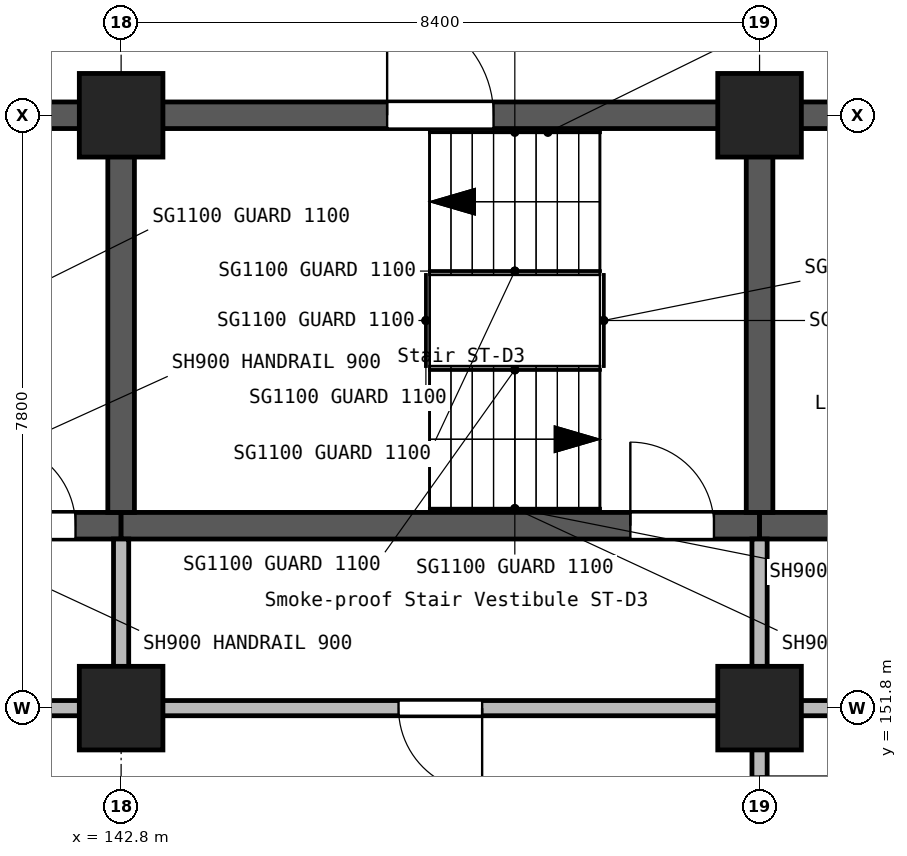
"""IFC4 building model, lengths in metres.
Left out: names, types, materials, properties, quantities, classifications, styles, units other than length and angle.
Written with IfcOpenShell. Run it as: python <this file> out.ifc"""

import sys

from ifc_helpers import new_model, si_unit, direction, frame, frame_2d, origin, origin_2d, place, context, subcontext, project, spatial, rectangle, extrude, element, fill, save


model = new_model("IFC4")
c1 = context("Model", 3, precision=1e-05, world=origin(), true_north=direction((0.0, 1.0)))
c2 = subcontext(c1, "Body", "Model", "MODEL_VIEW")
j1 = project(units=[si_unit("LENGTHUNIT", "METRE"), si_unit("PLANEANGLEUNIT", "RADIAN")], contexts=[c1])
p1 = place(None, origin())
s1 = spatial("IfcSite", under=j1, at=p1, CompositionType="ELEMENT")
p2 = place(p1, origin())
s2 = spatial("IfcBuilding", under=s1, at=p2, CompositionType="ELEMENT")
p3 = place(p2, origin())
s3 = spatial("IfcBuildingStorey", under=s2, at=p3, CompositionType="ELEMENT", Elevation=0.0)
for number, where, z_axis, x_axis in (
    (1, (142.8, 151.8, -0.3), (0.0, 0.0, 1.0), (1.0, 0.0, 0.0)),
    (2, (142.8, 159.6, -0.3), (0.0, 0.0, 1.0), (1.0, 0.0, 0.0)),
    (3, (151.2, 151.8, -0.3), (0.0, 0.0, 1.0), (1.0, 0.0, 0.0)),
    (4, (151.2, 159.6, -0.3), (0.0, 0.0, 1.0), (1.0, 0.0, 0.0)),
):
    element("IfcColumn", number, at=place(p3, frame(where, z_axis=z_axis, x_axis=x_axis)), inside=s3, PredefinedType="COLUMN", context=c2, shape_type="SweptSolid", body=[
        extrude(rectangle(XDim=1.1, YDim=1.1, at=origin_2d()), origin(), (0.0, 0.0, 1.0), 5.7),
    ])
p4 = place(p3, frame((134.225, 159.6, -0.3), z_axis=(0.0, 0.0, 1.0), x_axis=(1.0, 0.0, 0.0)))
e5 = element("IfcWall", 5, at=p4, inside=s3, PredefinedType="SHEAR", context=c2, shape_type="SweptSolid", body=[
    extrude(rectangle(XDim=8.575, YDim=0.35, at=frame_2d((4.288, 0.0))), origin(), (0.0, 0.0, 1.0), 5.7),
])
p5 = place(p4, frame((3.675, 0.0, 0.3)))
e6 = element("IfcOpeningElement", 6, at=p5, cuts=e5, PredefinedType="OPENING", context=c2, shape_type="SweptSolid", body=[
    extrude(rectangle(XDim=1.4, YDim=2.1, at=frame_2d((0.7, 1.05))), frame((0.0, 0.185, 0.0), z_axis=(0.0, -1.0, 0.0), x_axis=(1.0, 0.0, 0.0)), (0.0, 0.0, 1.0), 0.37),
])
p6 = place(p3, frame((134.575, 154.2, -0.3), z_axis=(0.0, 0.0, 1.0), x_axis=(1.0, 0.0, 0.0)))
e7 = element("IfcWall", 7, at=p6, inside=s3, PredefinedType="SHEAR", context=c2, shape_type="SweptSolid", body=[
    extrude(rectangle(XDim=8.225, YDim=0.35, at=frame_2d((4.113, 0.0))), origin(), (0.0, 0.0, 1.0), 5.7),
])
p7 = place(p6, frame((6.525, 0.0, 0.3)))
e8 = element("IfcOpeningElement", 8, at=p7, cuts=e7, PredefinedType="OPENING", context=c2, shape_type="SweptSolid", body=[
    extrude(rectangle(XDim=1.1, YDim=2.1, at=frame_2d((0.55, 1.05))), frame((0.0, 0.185, 0.0), z_axis=(0.0, -1.0, 0.0), x_axis=(1.0, 0.0, 0.0)), (0.0, 0.0, 1.0), 0.37),
])
p8 = place(p3, frame((142.8, 154.2, -0.3), z_axis=(0.0, 0.0, 1.0), x_axis=(1.0, 0.0, 0.0)))
e9 = element("IfcWall", 9, at=p8, inside=s3, PredefinedType="SHEAR", context=c2, shape_type="SweptSolid", body=[
    extrude(rectangle(XDim=8.4, YDim=0.35, at=frame_2d((4.2, 0.0))), origin(), (0.0, 0.0, 1.0), 5.7),
])
p9 = place(p8, frame((6.7, 0.0, 0.3)))
e10 = element("IfcOpeningElement", 10, at=p9, cuts=e9, PredefinedType="OPENING", context=c2, shape_type="SweptSolid", body=[
    extrude(rectangle(XDim=1.1, YDim=2.1, at=frame_2d((0.55, 1.05))), frame((0.0, 0.185, 0.0), z_axis=(0.0, -1.0, 0.0), x_axis=(1.0, 0.0, 0.0)), (0.0, 0.0, 1.0), 0.37),
])
p10 = place(p3, frame((142.8, 154.375, -0.3), z_axis=(0.0, 0.0, 1.0), x_axis=(0.0, 1.0, 0.0)))
e11 = element("IfcWall", 11, at=p10, inside=s3, PredefinedType="SHEAR", context=c2, shape_type="SweptSolid", body=[
    extrude(rectangle(XDim=5.05, YDim=0.35, at=frame_2d((2.525, 0.0))), origin(), (0.0, 0.0, 1.0), 5.7),
])
p11 = place(p3, frame((142.8, 159.6, -0.3), z_axis=(0.0, 0.0, 1.0), x_axis=(1.0, 0.0, 0.0)))
e12 = element("IfcWall", 12, at=p11, inside=s3, PredefinedType="SHEAR", context=c2, shape_type="SweptSolid", body=[
    extrude(rectangle(XDim=8.4, YDim=0.35, at=frame_2d((4.2, 0.0))), origin(), (0.0, 0.0, 1.0), 5.7),
])
p12 = place(p11, frame((3.5, 0.0, 0.3)))
e13 = element("IfcOpeningElement", 13, at=p12, cuts=e12, PredefinedType="OPENING", context=c2, shape_type="SweptSolid", body=[
    extrude(rectangle(XDim=1.4, YDim=2.1, at=frame_2d((0.7, 1.05))), frame((0.0, 0.185, 0.0), z_axis=(0.0, -1.0, 0.0), x_axis=(1.0, 0.0, 0.0)), (0.0, 0.0, 1.0), 0.37),
])
p13 = place(p3, frame((151.2, 154.2, -0.3), z_axis=(0.0, 0.0, 1.0), x_axis=(1.0, 0.0, 0.0)))
e14 = element("IfcWall", 14, at=p13, inside=s3, PredefinedType="SHEAR", context=c2, shape_type="SweptSolid", body=[
    extrude(rectangle(XDim=4.2, YDim=0.35, at=frame_2d((2.1, 0.0))), origin(), (0.0, 0.0, 1.0), 5.7),
])
p14 = place(p13, frame((1.55, 0.0, 0.3)))
e15 = element("IfcOpeningElement", 15, at=p14, cuts=e14, PredefinedType="OPENING", context=c2, shape_type="SweptSolid", body=[
    extrude(rectangle(XDim=1.1, YDim=2.1, at=frame_2d((0.55, 1.05))), frame((0.0, 0.185, 0.0), z_axis=(0.0, -1.0, 0.0), x_axis=(1.0, 0.0, 0.0)), (0.0, 0.0, 1.0), 0.37),
])
p15 = place(p3, frame((151.2, 154.375, -0.3), z_axis=(0.0, 0.0, 1.0), x_axis=(0.0, 1.0, 0.0)))
e16 = element("IfcWall", 16, at=p15, inside=s3, PredefinedType="SHEAR", context=c2, shape_type="SweptSolid", body=[
    extrude(rectangle(XDim=5.05, YDim=0.35, at=frame_2d((2.525, 0.0))), origin(), (0.0, 0.0, 1.0), 5.7),
])
p16 = place(p3, frame((151.2, 159.6, -0.3), z_axis=(0.0, 0.0, 1.0), x_axis=(1.0, 0.0, 0.0)))
e17 = element("IfcWall", 17, at=p16, inside=s3, PredefinedType="SHEAR", context=c2, shape_type="SweptSolid", body=[
    extrude(rectangle(XDim=4.2, YDim=0.35, at=frame_2d((2.1, 0.0))), origin(), (0.0, 0.0, 1.0), 5.7),
])
p17 = place(p3, frame((151.2, 154.025, 0.0), z_axis=(0.0, 0.0, 1.0), x_axis=(0.0, -1.0, 0.0)))
e18 = element("IfcWall", 18, at=p17, inside=s3, PredefinedType="SOLIDWALL", context=c2, shape_type="SweptSolid", body=[
    extrude(rectangle(XDim=1.725, YDim=0.2, at=frame_2d((0.862, 0.0))), origin(), (0.0, 0.0, 1.0), 5.05),
])
p18 = place(p3, frame((151.2, 151.3, 0.0), z_axis=(0.0, 0.0, 1.0), x_axis=(0.0, -1.0, 0.0)))
e19 = element("IfcWall", 19, at=p18, inside=s3, PredefinedType="SOLIDWALL", context=c2, shape_type="SweptSolid", body=[
    extrude(rectangle(XDim=2.6, YDim=0.2, at=frame_2d((1.3, 0.0))), origin(), (0.0, 0.0, 1.0), 5.05),
])
p19 = place(p18, frame((0.4, 0.0, 0.0)))
e20 = element("IfcOpeningElement", 20, at=p19, cuts=e19, PredefinedType="OPENING", context=c2, shape_type="SweptSolid", body=[
    extrude(rectangle(XDim=1.8, YDim=2.1, at=frame_2d((0.9, 1.05))), frame((0.0, 0.11, 0.0), z_axis=(0.0, -1.0, 0.0), x_axis=(1.0, 0.0, 0.0)), (0.0, 0.0, 1.0), 0.22),
])
p20 = place(p3, frame((159.1, 151.8, 0.0), z_axis=(0.0, 0.0, 1.0), x_axis=(-1.0, 0.0, 0.0)))
e21 = element("IfcWall", 21, at=p20, inside=s3, PredefinedType="SOLIDWALL", context=c2, shape_type="SweptSolid", body=[
    extrude(rectangle(XDim=7.4, YDim=0.2, at=frame_2d((3.7, 0.0))), origin(), (0.0, 0.0, 1.0), 5.05),
])
p21 = place(p20, frame((2.8, 0.0, 0.0)))
e22 = element("IfcOpeningElement", 22, at=p21, cuts=e21, PredefinedType="OPENING", context=c2, shape_type="SweptSolid", body=[
    extrude(rectangle(XDim=1.8, YDim=2.1, at=frame_2d((0.9, 1.05))), frame((0.0, 0.11, 0.0), z_axis=(0.0, -1.0, 0.0), x_axis=(1.0, 0.0, 0.0)), (0.0, 0.0, 1.0), 0.22),
])
p22 = place(p3, frame((150.7, 151.8, 0.0), z_axis=(0.0, 0.0, 1.0), x_axis=(-1.0, 0.0, 0.0)))
e23 = element("IfcWall", 23, at=p22, inside=s3, PredefinedType="SOLIDWALL", context=c2, shape_type="SweptSolid", body=[
    extrude(rectangle(XDim=7.4, YDim=0.2, at=frame_2d((3.7, 0.0))), origin(), (0.0, 0.0, 1.0), 5.05),
])
p23 = place(p22, frame((3.15, 0.0, 0.0)))
e24 = element("IfcOpeningElement", 24, at=p23, cuts=e23, PredefinedType="OPENING", context=c2, shape_type="SweptSolid", body=[
    extrude(rectangle(XDim=1.1, YDim=2.1, at=frame_2d((0.55, 1.05))), frame((0.0, 0.11, 0.0), z_axis=(0.0, -1.0, 0.0), x_axis=(1.0, 0.0, 0.0)), (0.0, 0.0, 1.0), 0.22),
])
p24 = place(p3, frame((142.3, 151.8, 0.0), z_axis=(0.0, 0.0, 1.0), x_axis=(-1.0, 0.0, 0.0)))
e25 = element("IfcWall", 25, at=p24, inside=s3, PredefinedType="SOLIDWALL", context=c2, shape_type="SweptSolid", body=[
    extrude(rectangle(XDim=7.4, YDim=0.2, at=frame_2d((3.7, 0.0))), origin(), (0.0, 0.0, 1.0), 5.05),
])
p25 = place(p24, frame((3.15, 0.0, 0.0)))
e26 = element("IfcOpeningElement", 26, at=p25, cuts=e25, PredefinedType="OPENING", context=c2, shape_type="SweptSolid", body=[
    extrude(rectangle(XDim=1.1, YDim=2.1, at=frame_2d((0.55, 1.05))), frame((0.0, 0.11, 0.0), z_axis=(0.0, -1.0, 0.0), x_axis=(1.0, 0.0, 0.0)), (0.0, 0.0, 1.0), 0.22),
])
p26 = place(p3, frame((142.8, 152.3, 0.0), z_axis=(0.0, 0.0, 1.0), x_axis=(0.0, 1.0, 0.0)))
e27 = element("IfcWall", 27, at=p26, inside=s3, PredefinedType="SOLIDWALL", context=c2, shape_type="SweptSolid", body=[
    extrude(rectangle(XDim=1.725, YDim=0.2, at=frame_2d((0.862, 0.0))), origin(), (0.0, 0.0, 1.0), 5.05),
])
p27 = place(p12, origin())
e28 = element("IfcDoor", 28, at=p27, inside=s3, OperationType="SINGLE_SWING_LEFT", PredefinedType="DOOR", context=c2, shape_type="SweptSolid", body=[
    extrude(rectangle(XDim=1.4, YDim=2.1, at=frame_2d((0.7, 1.05))), frame((0.0, 0.025, 0.0), z_axis=(0.0, -1.0, 0.0), x_axis=(1.0, 0.0, 0.0)), (0.0, 0.0, 1.0), 0.05),
])
fill(e13, e28)
p28 = place(p19, frame((1.8, 0.0, 0.0), z_axis=(0.0, 0.0, 1.0), x_axis=(-1.0, 0.0, 0.0)))
e29 = element("IfcDoor", 29, at=p28, inside=s3, OperationType="DOUBLE_DOOR_SINGLE_SWING", PredefinedType="DOOR", context=c2, shape_type="SweptSolid", body=[
    extrude(rectangle(XDim=1.8, YDim=2.1, at=frame_2d((0.9, 1.05))), frame((0.0, 0.025, 0.0), z_axis=(0.0, -1.0, 0.0), x_axis=(1.0, 0.0, 0.0)), (0.0, 0.0, 1.0), 0.05),
])
fill(e20, e29)
p29 = place(p7, origin())
e30 = element("IfcDoor", 30, at=p29, inside=s3, OperationType="SINGLE_SWING_RIGHT", PredefinedType="DOOR", context=c2, shape_type="SweptSolid", body=[
    extrude(rectangle(XDim=1.1, YDim=2.1, at=frame_2d((0.55, 1.05))), frame((0.0, 0.025, 0.0), z_axis=(0.0, -1.0, 0.0), x_axis=(1.0, 0.0, 0.0)), (0.0, 0.0, 1.0), 0.05),
])
fill(e8, e30)
p30 = place(p9, origin())
e31 = element("IfcDoor", 31, at=p30, inside=s3, OperationType="SINGLE_SWING_RIGHT", PredefinedType="DOOR", context=c2, shape_type="SweptSolid", body=[
    extrude(rectangle(XDim=1.1, YDim=2.1, at=frame_2d((0.55, 1.05))), frame((0.0, 0.025, 0.0), z_axis=(0.0, -1.0, 0.0), x_axis=(1.0, 0.0, 0.0)), (0.0, 0.0, 1.0), 0.05),
])
fill(e10, e31)
p31 = place(p23, frame((1.1, 0.0, 0.0), z_axis=(0.0, 0.0, 1.0), x_axis=(-1.0, 0.0, 0.0)))
e32 = element("IfcDoor", 32, at=p31, inside=s3, OperationType="SINGLE_SWING_RIGHT", PredefinedType="DOOR", context=c2, shape_type="SweptSolid", body=[
    extrude(rectangle(XDim=1.1, YDim=2.1, at=frame_2d((0.55, 1.05))), frame((0.0, 0.025, 0.0), z_axis=(0.0, -1.0, 0.0), x_axis=(1.0, 0.0, 0.0)), (0.0, 0.0, 1.0), 0.05),
])
fill(e24, e32)
save(model, sys.argv[1])
